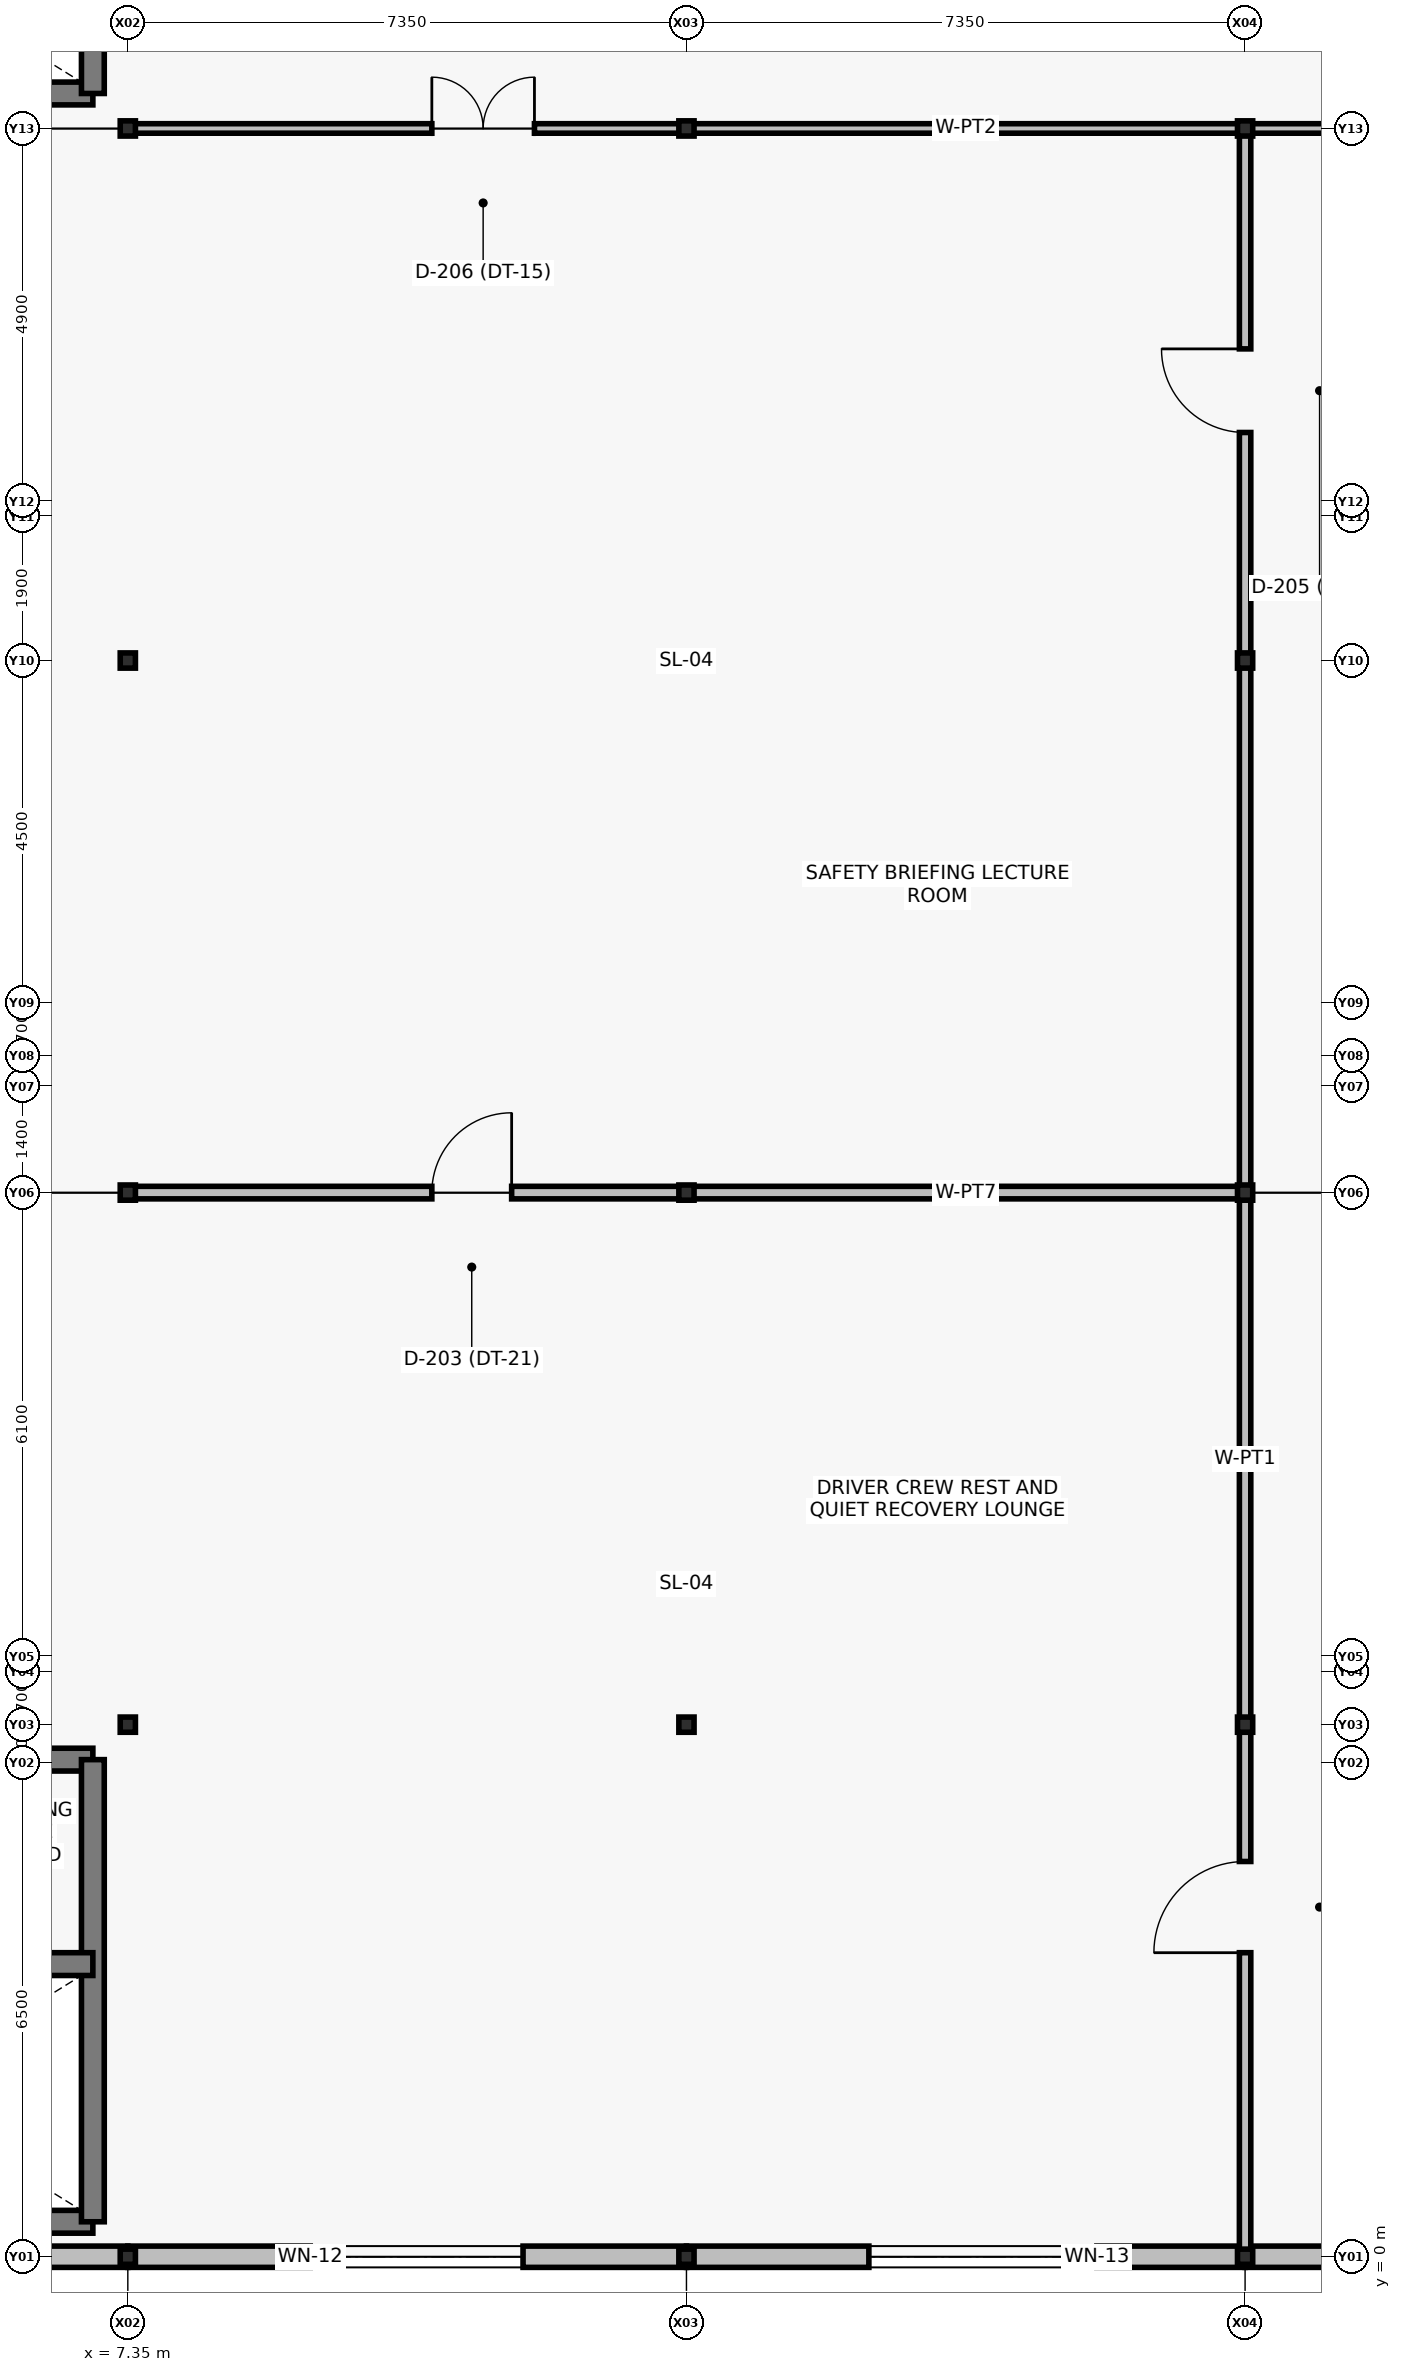
"""IFC4 building model, lengths in metres.
Left out: names, types, materials, properties, quantities, classifications, styles, units other than length and angle.
Written with IfcOpenShell. Run it as: python <this file> out.ifc"""

import sys

from ifc_helpers import new_model, si_unit, direction, frame, frame_2d, origin, origin_with_axes, origin_2d, place, context, subcontext, project, spatial, rectangle, i_section, extrude, element, fill, save


model = new_model("IFC4")
c1 = context("Model", 3, precision=1e-05, world=origin(), true_north=direction((0.0, 1.0)))
c2 = subcontext(c1, "Body", "Model", "MODEL_VIEW")
j1 = project(units=[si_unit("LENGTHUNIT", "METRE"), si_unit("PLANEANGLEUNIT", "RADIAN")], contexts=[c1])
p1 = place(None, origin())
s1 = spatial("IfcSite", under=j1, at=p1, CompositionType="ELEMENT")
p2 = place(p1, origin())
s2 = spatial("IfcBuilding", under=s1, at=p2, CompositionType="ELEMENT")
p3 = place(p2, frame((0.0, 0.0, 19.5)))
s3 = spatial("IfcBuildingStorey", under=s2, at=p3, CompositionType="ELEMENT", Elevation=19.5)
for number, where, z_axis, x_axis in (
    (1, (7.35, 0.0, 0.0), (0.0, 0.0, 1.0), (1.0, 0.0, 0.0)),
    (2, (7.35, 7.0, 0.0), (0.0, 0.0, 1.0), (1.0, 0.0, 0.0)),
    (3, (7.35, 14.0, 0.0), (0.0, 0.0, 1.0), (1.0, 0.0, 0.0)),
    (4, (7.35, 21.0, 0.0), (0.0, 0.0, 1.0), (1.0, 0.0, 0.0)),
    (5, (7.35, 28.0, 0.0), (0.0, 0.0, 1.0), (1.0, 0.0, 0.0)),
    (6, (14.7, 0.0, 0.0), (0.0, 0.0, 1.0), (1.0, 0.0, 0.0)),
    (7, (14.7, 7.0, 0.0), (0.0, 0.0, 1.0), (1.0, 0.0, 0.0)),
    (8, (14.7, 14.0, 0.0), (0.0, 0.0, 1.0), (1.0, 0.0, 0.0)),
    (9, (14.7, 21.0, 0.0), (0.0, 0.0, 1.0), (1.0, 0.0, 0.0)),
    (10, (14.7, 28.0, 0.0), (0.0, 0.0, 1.0), (1.0, 0.0, 0.0)),
    (11, (22.05, 0.0, 0.0), (0.0, 0.0, 1.0), (1.0, 0.0, 0.0)),
    (12, (22.05, 7.0, 0.0), (0.0, 0.0, 1.0), (1.0, 0.0, 0.0)),
    (13, (22.05, 14.0, 0.0), (0.0, 0.0, 1.0), (1.0, 0.0, 0.0)),
    (14, (22.05, 21.0, 0.0), (0.0, 0.0, 1.0), (1.0, 0.0, 0.0)),
    (15, (22.05, 28.0, 0.0), (0.0, 0.0, 1.0), (1.0, 0.0, 0.0)),
):
    element("IfcColumn", number, at=place(p3, frame(where, z_axis=z_axis, x_axis=x_axis)), inside=s3, PredefinedType="COLUMN", context=c2, shape_type="SweptSolid", body=[
        extrude(i_section(OverallWidth=0.2, OverallDepth=0.2, WebThickness=0.008, FlangeThickness=0.012, at=origin_2d()), origin(), (0.0, 0.0, 1.0), 4.2),
    ])
p4 = place(p3, origin_with_axes())
e16 = element("IfcWall", 16, at=p4, inside=s3, PredefinedType="SOLIDWALL", context=c2, shape_type="SweptSolid", body=[
    extrude(rectangle(XDim=7.35, YDim=0.28, at=frame_2d((3.675, 0.0))), origin(), (0.0, 0.0, 1.0), 3.48),
])
p5 = place(p4, frame((2.4, 0.0, 0.9)))
e17 = element("IfcOpeningElement", 17, at=p5, cuts=e16, PredefinedType="OPENING", context=c2, shape_type="SweptSolid", body=[
    extrude(rectangle(XDim=2.6, YDim=2.0, at=frame_2d((1.3, 1.0))), frame((0.0, 0.15, 0.0), z_axis=(0.0, -1.0, 0.0), x_axis=(1.0, 0.0, 0.0)), (0.0, 0.0, 1.0), 0.3),
])
p6 = place(p3, frame((7.35, 0.0, 0.0), z_axis=(0.0, 0.0, 1.0), x_axis=(1.0, 0.0, 0.0)))
e18 = element("IfcWall", 18, at=p6, inside=s3, PredefinedType="SOLIDWALL", context=c2, shape_type="SweptSolid", body=[
    extrude(rectangle(XDim=7.35, YDim=0.28, at=frame_2d((3.675, 0.0))), origin(), (0.0, 0.0, 1.0), 3.48),
])
p7 = place(p6, frame((2.4, 0.0, 0.9)))
e19 = element("IfcOpeningElement", 19, at=p7, cuts=e18, PredefinedType="OPENING", context=c2, shape_type="SweptSolid", body=[
    extrude(rectangle(XDim=2.8, YDim=2.1, at=frame_2d((1.4, 1.05))), frame((0.0, 0.15, 0.0), z_axis=(0.0, -1.0, 0.0), x_axis=(1.0, 0.0, 0.0)), (0.0, 0.0, 1.0), 0.3),
])
p8 = place(p3, frame((14.7, 0.0, 0.0), z_axis=(0.0, 0.0, 1.0), x_axis=(1.0, 0.0, 0.0)))
e20 = element("IfcWall", 20, at=p8, inside=s3, PredefinedType="SOLIDWALL", context=c2, shape_type="SweptSolid", body=[
    extrude(rectangle(XDim=7.35, YDim=0.28, at=frame_2d((3.675, 0.0))), origin(), (0.0, 0.0, 1.0), 3.48),
])
p9 = place(p8, frame((2.4, 0.0, 0.9)))
e21 = element("IfcOpeningElement", 21, at=p9, cuts=e20, PredefinedType="OPENING", context=c2, shape_type="SweptSolid", body=[
    extrude(rectangle(XDim=3.0, YDim=1.8, at=frame_2d((1.5, 0.9))), frame((0.0, 0.15, 0.0), z_axis=(0.0, -1.0, 0.0), x_axis=(1.0, 0.0, 0.0)), (0.0, 0.0, 1.0), 0.3),
])
p10 = place(p3, frame((22.05, 0.0, 0.0), z_axis=(0.0, 0.0, 1.0), x_axis=(1.0, 0.0, 0.0)))
e22 = element("IfcWall", 22, at=p10, inside=s3, PredefinedType="SOLIDWALL", context=c2, shape_type="SweptSolid", body=[
    extrude(rectangle(XDim=7.35, YDim=0.28, at=frame_2d((3.675, 0.0))), origin(), (0.0, 0.0, 1.0), 3.48),
])
p11 = place(p10, frame((2.4, 0.0, 0.9)))
e23 = element("IfcOpeningElement", 23, at=p11, cuts=e22, PredefinedType="OPENING", context=c2, shape_type="SweptSolid", body=[
    extrude(rectangle(XDim=3.0, YDim=2.2, at=frame_2d((1.5, 1.1))), frame((0.0, 0.15, 0.0), z_axis=(0.0, -1.0, 0.0), x_axis=(1.0, 0.0, 0.0)), (0.0, 0.0, 1.0), 0.3),
])
p12 = place(p3, frame((0.46, 28.46, 0.0), z_axis=(0.0, 0.0, 1.0), x_axis=(1.0, 0.0, 0.0)))
e24 = element("IfcWall", 24, at=p12, inside=s3, PredefinedType="SHEAR", context=c2, shape_type="SweptSolid", body=[
    extrude(rectangle(XDim=6.43, YDim=0.3, at=frame_2d((3.215, 0.0))), origin(), (0.0, 0.0, 1.0), 3.92),
])
p13 = place(p3, frame((6.89, 28.46, 0.0), z_axis=(0.0, 0.0, 1.0), x_axis=(0.0, 1.0, 0.0)))
e25 = element("IfcWall", 25, at=p13, inside=s3, PredefinedType="SHEAR", context=c2, shape_type="SweptSolid", body=[
    extrude(rectangle(XDim=6.08, YDim=0.3, at=frame_2d((3.04, 0.0))), origin(), (0.0, 0.0, 1.0), 3.92),
])
p14 = place(p3, frame((0.46, 0.46, 0.0), z_axis=(0.0, 0.0, 1.0), x_axis=(1.0, 0.0, 0.0)))
e26 = element("IfcWall", 26, at=p14, inside=s3, PredefinedType="SHEAR", context=c2, shape_type="SweptSolid", body=[
    extrude(rectangle(XDim=6.43, YDim=0.3, at=frame_2d((3.215, 0.0))), origin(), (0.0, 0.0, 1.0), 3.92),
])
p15 = place(p3, frame((0.46, 6.54, 0.0), z_axis=(0.0, 0.0, 1.0), x_axis=(1.0, 0.0, 0.0)))
e27 = element("IfcWall", 27, at=p15, inside=s3, PredefinedType="SHEAR", context=c2, shape_type="SweptSolid", body=[
    extrude(rectangle(XDim=6.43, YDim=0.3, at=frame_2d((3.215, 0.0))), origin(), (0.0, 0.0, 1.0), 3.92),
])
p16 = place(p15, frame((0.55, 0.0, 0.0)))
e28 = element("IfcOpeningElement", 28, at=p16, cuts=e27, PredefinedType="OPENING", context=c2, shape_type="SweptSolid", body=[
    extrude(rectangle(XDim=1.5, YDim=2.2, at=frame_2d((0.75, 1.1))), frame((0.0, 0.16, 0.0), z_axis=(0.0, -1.0, 0.0), x_axis=(1.0, 0.0, 0.0)), (0.0, 0.0, 1.0), 0.32),
])
p17 = place(p3, frame((6.89, 0.46, 0.0), z_axis=(0.0, 0.0, 1.0), x_axis=(0.0, 1.0, 0.0)))
e29 = element("IfcWall", 29, at=p17, inside=s3, PredefinedType="SHEAR", context=c2, shape_type="SweptSolid", body=[
    extrude(rectangle(XDim=6.08, YDim=0.3, at=frame_2d((3.04, 0.0))), origin(), (0.0, 0.0, 1.0), 3.92),
])
p18 = place(p3, frame((0.46, 3.85, 0.0), z_axis=(0.0, 0.0, 1.0), x_axis=(1.0, 0.0, 0.0)))
e30 = element("IfcWall", 30, at=p18, inside=s3, PredefinedType="SHEAR", context=c2, shape_type="SweptSolid", body=[
    extrude(rectangle(XDim=6.43, YDim=0.3, at=frame_2d((3.215, 0.0))), origin(), (0.0, 0.0, 1.0), 3.92),
])
p19 = place(p18, frame((0.185, 0.0, 0.0)))
e31 = element("IfcOpeningElement", 31, at=p19, cuts=e30, PredefinedType="OPENING", context=c2, shape_type="SweptSolid", body=[
    extrude(rectangle(XDim=1.05, YDim=2.15, at=frame_2d((0.525, 1.075))), frame((0.0, 0.16, 0.0), z_axis=(0.0, -1.0, 0.0), x_axis=(1.0, 0.0, 0.0)), (0.0, 0.0, 1.0), 0.32),
])
p20 = place(p3, frame((7.35, 14.0, 0.0), z_axis=(0.0, 0.0, 1.0), x_axis=(1.0, 0.0, 0.0)))
e32 = element("IfcWall", 32, at=p20, inside=s3, PredefinedType="PARTITIONING", context=c2, shape_type="SweptSolid", body=[
    extrude(rectangle(XDim=14.7, YDim=0.165, at=frame_2d((7.35, 0.0))), origin(), (0.0, 0.0, 1.0), 3.25),
])
p21 = place(p20, frame((4.0, 0.0, 0.0)))
e33 = element("IfcOpeningElement", 33, at=p21, cuts=e32, PredefinedType="OPENING", context=c2, shape_type="SweptSolid", body=[
    extrude(rectangle(XDim=1.05, YDim=2.1, at=frame_2d((0.525, 1.05))), frame((0.0, 0.092, 0.0), z_axis=(0.0, -1.0, 0.0), x_axis=(1.0, 0.0, 0.0)), (0.0, 0.0, 1.0), 0.185),
])
p22 = place(p3, frame((22.05, 0.0, 0.0), z_axis=(0.0, 0.0, 1.0), x_axis=(0.0, 1.0, 0.0)))
e34 = element("IfcWall", 34, at=p22, inside=s3, PredefinedType="PARTITIONING", context=c2, shape_type="SweptSolid", body=[
    extrude(rectangle(XDim=28.0, YDim=0.15, at=frame_2d((14.0, 0.0))), origin(), (0.0, 0.0, 1.0), 3.25),
])
p23 = place(p22, frame((4.0, 0.0, 0.0)))
e35 = element("IfcOpeningElement", 35, at=p23, cuts=e34, PredefinedType="OPENING", context=c2, shape_type="SweptSolid", body=[
    extrude(rectangle(XDim=1.2, YDim=2.1, at=frame_2d((0.6, 1.05))), frame((0.0, 0.085, 0.0), z_axis=(0.0, -1.0, 0.0), x_axis=(1.0, 0.0, 0.0)), (0.0, 0.0, 1.0), 0.17),
])
p24 = place(p22, frame((24.0, 0.0, 0.0)))
e36 = element("IfcOpeningElement", 36, at=p24, cuts=e34, PredefinedType="OPENING", context=c2, shape_type="SweptSolid", body=[
    extrude(rectangle(XDim=1.1, YDim=2.1, at=frame_2d((0.55, 1.05))), frame((0.0, 0.085, 0.0), z_axis=(0.0, -1.0, 0.0), x_axis=(1.0, 0.0, 0.0)), (0.0, 0.0, 1.0), 0.17),
])
p25 = place(p3, frame((7.35, 28.0, 0.0), z_axis=(0.0, 0.0, 1.0), x_axis=(1.0, 0.0, 0.0)))
e37 = element("IfcWall", 37, at=p25, inside=s3, PredefinedType="PARTITIONING", context=c2, shape_type="SweptSolid", body=[
    extrude(rectangle(XDim=22.05, YDim=0.125, at=frame_2d((11.025, 0.0))), origin(), (0.0, 0.0, 1.0), 3.25),
])
p26 = place(p25, frame((4.0, 0.0, 0.0)))
e38 = element("IfcOpeningElement", 38, at=p26, cuts=e37, PredefinedType="OPENING", context=c2, shape_type="SweptSolid", body=[
    extrude(rectangle(XDim=1.35, YDim=2.2, at=frame_2d((0.675, 1.1))), frame((0.0, 0.072, 0.0), z_axis=(0.0, -1.0, 0.0), x_axis=(1.0, 0.0, 0.0)), (0.0, 0.0, 1.0), 0.145),
])
p27 = place(p25, frame((17.5, 0.0, 0.0)))
e39 = element("IfcOpeningElement", 39, at=p27, cuts=e37, PredefinedType="OPENING", context=c2, shape_type="SweptSolid", body=[
    extrude(rectangle(XDim=1.0, YDim=2.2, at=frame_2d((0.5, 1.1))), frame((0.0, 0.072, 0.0), z_axis=(0.0, -1.0, 0.0), x_axis=(1.0, 0.0, 0.0)), (0.0, 0.0, 1.0), 0.145),
])
p28 = place(p7, origin())
e40 = element("IfcWindow", 40, at=p28, inside=s3, PartitioningType="SINGLE_PANEL", PredefinedType="WINDOW", context=c2, shape_type="SweptSolid", body=[
    extrude(rectangle(XDim=2.8, YDim=2.1, at=frame_2d((1.4, 1.05))), frame((0.0, 0.03, 0.0), z_axis=(0.0, -1.0, 0.0), x_axis=(1.0, 0.0, 0.0)), (0.0, 0.0, 1.0), 0.06),
])
fill(e19, e40)
p29 = place(p9, origin())
e41 = element("IfcWindow", 41, at=p29, inside=s3, PartitioningType="SINGLE_PANEL", PredefinedType="WINDOW", context=c2, shape_type="SweptSolid", body=[
    extrude(rectangle(XDim=3.0, YDim=1.8, at=frame_2d((1.5, 0.9))), frame((0.0, 0.03, 0.0), z_axis=(0.0, -1.0, 0.0), x_axis=(1.0, 0.0, 0.0)), (0.0, 0.0, 1.0), 0.06),
])
fill(e21, e41)
p30 = place(p21, origin())
e42 = element("IfcDoor", 42, at=p30, inside=s3, OperationType="SINGLE_SWING_RIGHT", PredefinedType="DOOR", context=c2, shape_type="SweptSolid", body=[
    extrude(rectangle(XDim=1.05, YDim=2.1, at=frame_2d((0.525, 1.05))), frame((0.0, 0.025, 0.0), z_axis=(0.0, -1.0, 0.0), x_axis=(1.0, 0.0, 0.0)), (0.0, 0.0, 1.0), 0.05),
])
fill(e33, e42)
p31 = place(p23, origin())
e43 = element("IfcDoor", 43, at=p31, inside=s3, OperationType="SINGLE_SWING_LEFT", PredefinedType="DOOR", context=c2, shape_type="SweptSolid", body=[
    extrude(rectangle(XDim=1.2, YDim=2.1, at=frame_2d((0.6, 1.05))), frame((0.0, 0.025, 0.0), z_axis=(0.0, -1.0, 0.0), x_axis=(1.0, 0.0, 0.0)), (0.0, 0.0, 1.0), 0.05),
])
fill(e35, e43)
p32 = place(p24, origin())
e44 = element("IfcDoor", 44, at=p32, inside=s3, OperationType="SINGLE_SWING_RIGHT", PredefinedType="DOOR", context=c2, shape_type="SweptSolid", body=[
    extrude(rectangle(XDim=1.1, YDim=2.1, at=frame_2d((0.55, 1.05))), frame((0.0, 0.025, 0.0), z_axis=(0.0, -1.0, 0.0), x_axis=(1.0, 0.0, 0.0)), (0.0, 0.0, 1.0), 0.05),
])
fill(e36, e44)
p33 = place(p26, origin())
e45 = element("IfcDoor", 45, at=p33, inside=s3, OperationType="DOUBLE_DOOR_SINGLE_SWING", PredefinedType="DOOR", context=c2, shape_type="SweptSolid", body=[
    extrude(rectangle(XDim=1.35, YDim=2.2, at=frame_2d((0.675, 1.1))), frame((0.0, 0.025, 0.0), z_axis=(0.0, -1.0, 0.0), x_axis=(1.0, 0.0, 0.0)), (0.0, 0.0, 1.0), 0.05),
])
fill(e38, e45)
save(model, sys.argv[1])
